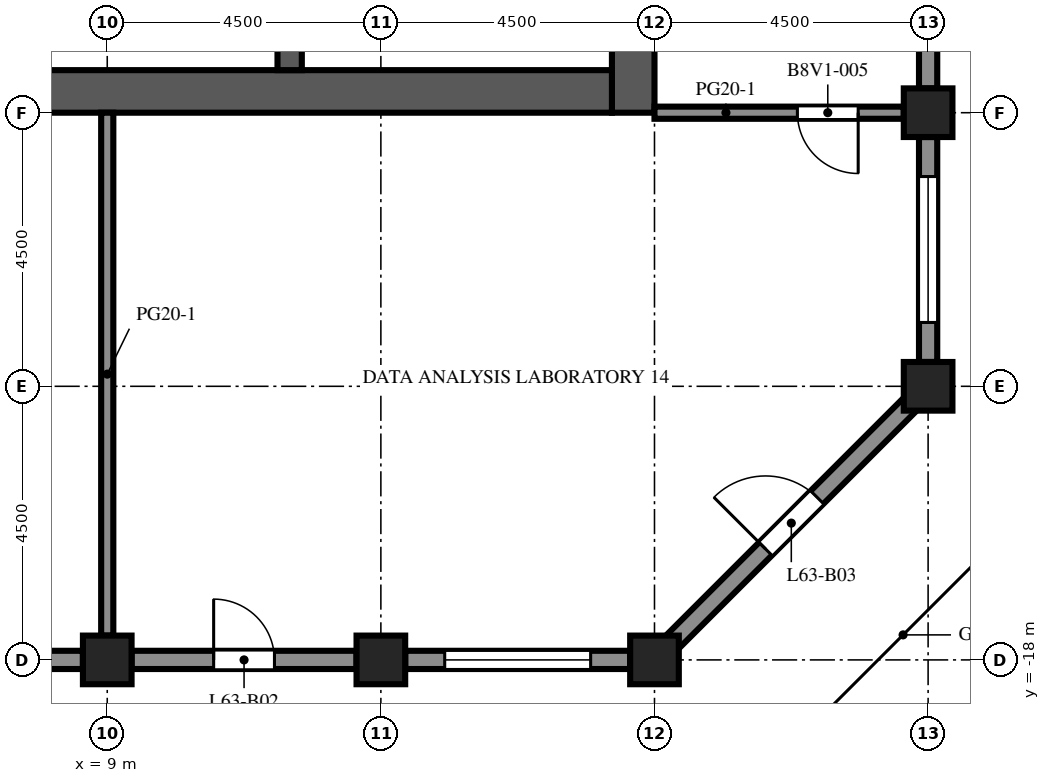
"""IFC4 building model, lengths in metres.
Left out: names, types, materials, properties, quantities, classifications, styles, units other than length and angle.
Written with IfcOpenShell. Run it as: python <this file> out.ifc"""

import sys

from ifc_helpers import new_model, si_unit, direction, frame, frame_2d, origin, origin_2d, place, context, subcontext, project, spatial, rectangle, extrude, element, fill, save


model = new_model("IFC4")
c1 = context("Model", 3, precision=1e-05, world=origin(), true_north=direction((0.0, 1.0)))
c2 = subcontext(c1, "Body", "Model", "MODEL_VIEW")
j1 = project(units=[si_unit("LENGTHUNIT", "METRE"), si_unit("PLANEANGLEUNIT", "RADIAN")], contexts=[c1])
p1 = place(None, origin())
s1 = spatial("IfcSite", under=j1, at=p1, CompositionType="ELEMENT")
p2 = place(p1, origin())
s2 = spatial("IfcBuilding", under=s1, at=p2, CompositionType="ELEMENT")
p3 = place(p2, frame((0.0, 0.0, 278.6)))
s3 = spatial("IfcBuildingStorey", under=s2, at=p3, CompositionType="ELEMENT", Elevation=278.6)
for number, where, z_axis, x_axis in (
    (1, (9.0, -18.0, 0.0), (0.0, 0.0, 1.0), (1.0, 0.0, 0.0)),
    (2, (13.5, -18.0, 0.0), (0.0, 0.0, 1.0), (1.0, 0.0, 0.0)),
    (3, (18.0, -18.0, 0.0), (0.0, 0.0, 1.0), (1.0, 0.0, 0.0)),
    (4, (22.5, -13.5, 0.0), (0.0, 0.0, 1.0), (1.0, 0.0, 0.0)),
    (5, (22.5, -9.0, 0.0), (0.0, 0.0, 1.0), (1.0, 0.0, 0.0)),
):
    element("IfcColumn", number, at=place(p3, frame(where, z_axis=z_axis, x_axis=x_axis)), inside=s3, PredefinedType="COLUMN", context=c2, shape_type="SweptSolid", body=[
        extrude(rectangle(XDim=0.8, YDim=0.8, at=origin_2d()), origin(), (0.0, 0.0, 1.0), 4.1),
    ])
p4 = place(p3, frame((17.65, -9.0, 0.0), z_axis=(0.0, 0.0, 1.0), x_axis=(0.0, 1.0, 0.0)))
e6 = element("IfcWall", 6, at=p4, inside=s3, PredefinedType="SHEAR", context=c2, shape_type="SweptSolid", body=[
    extrude(rectangle(XDim=27.5, YDim=0.7, at=frame_2d((13.75, 0.0))), origin(), (0.0, 0.0, 1.0), 4.1),
])
p5 = place(p4, frame((12.55, 0.0, 0.0)))
e7 = element("IfcOpeningElement", 7, at=p5, cuts=e6, PredefinedType="OPENING", context=c2, shape_type="SweptSolid", body=[
    extrude(rectangle(XDim=2.4, YDim=2.4, at=frame_2d((1.2, 1.2))), frame((0.0, 0.36, 0.0), z_axis=(0.0, -1.0, 0.0), x_axis=(1.0, 0.0, 0.0)), (0.0, 0.0, 1.0), 0.72),
])
p6 = place(p4, frame((6.825, 0.0, 0.0)))
e8 = element("IfcOpeningElement", 8, at=p6, cuts=e6, PredefinedType="OPENING", context=c2, shape_type="SweptSolid", body=[
    extrude(rectangle(XDim=1.2, YDim=2.1, at=frame_2d((0.6, 1.05))), frame((0.0, 0.36, 0.0), z_axis=(0.0, -1.0, 0.0), x_axis=(1.0, 0.0, 0.0)), (0.0, 0.0, 1.0), 0.72),
])
p7 = place(p4, frame((19.475, 0.0, 0.0)))
e9 = element("IfcOpeningElement", 9, at=p7, cuts=e6, PredefinedType="OPENING", context=c2, shape_type="SweptSolid", body=[
    extrude(rectangle(XDim=1.2, YDim=2.1, at=frame_2d((0.6, 1.05))), frame((0.0, 0.36, 0.0), z_axis=(0.0, -1.0, 0.0), x_axis=(1.0, 0.0, 0.0)), (0.0, 0.0, 1.0), 0.72),
])
p8 = place(p3, frame((6.7, -8.65, 0.0), z_axis=(0.0, 0.0, 1.0), x_axis=(1.0, 0.0, 0.0)))
e10 = element("IfcWall", 10, at=p8, inside=s3, PredefinedType="SHEAR", context=c2, shape_type="SweptSolid", body=[
    extrude(rectangle(XDim=10.6, YDim=0.7, at=frame_2d((5.3, 0.0))), origin(), (0.0, 0.0, 1.0), 4.1),
])
p9 = place(p3, frame((12.0, -8.3, 0.0), z_axis=(0.0, 0.0, 1.0), x_axis=(0.0, 1.0, 0.0)))
e11 = element("IfcWall", 11, at=p9, inside=s3, PredefinedType="SHEAR", context=c2, shape_type="SweptSolid", body=[
    extrude(rectangle(XDim=7.6, YDim=0.4, at=frame_2d((3.8, 0.0))), origin(), (0.0, 0.0, 1.0), 4.1),
])
p10 = place(p3, frame((8.6, -18.0, 0.0), z_axis=(0.0, 0.0, 1.0), x_axis=(-1.0, 0.0, 0.0)))
e12 = element("IfcWall", 12, at=p10, inside=s3, PredefinedType="SOLIDWALL", context=c2, shape_type="SweptSolid", body=[
    extrude(rectangle(XDim=3.7, YDim=0.3, at=frame_2d((1.85, 0.0))), origin(), (0.0, 0.0, 1.0), 2.85),
])
p11 = place(p10, frame((0.65, 0.0, 0.8)))
e13 = element("IfcOpeningElement", 13, at=p11, cuts=e12, PredefinedType="OPENING", context=c2, shape_type="SweptSolid", body=[
    extrude(rectangle(XDim=2.4, YDim=1.7, at=frame_2d((1.2, 0.85))), frame((0.0, 0.16, 0.0), z_axis=(0.0, -1.0, 0.0), x_axis=(1.0, 0.0, 0.0)), (0.0, 0.0, 1.0), 0.32),
])
p12 = place(p3, frame((13.1, -18.0, 0.0), z_axis=(0.0, 0.0, 1.0), x_axis=(-1.0, 0.0, 0.0)))
e14 = element("IfcWall", 14, at=p12, inside=s3, PredefinedType="SOLIDWALL", context=c2, shape_type="SweptSolid", body=[
    extrude(rectangle(XDim=3.7, YDim=0.3, at=frame_2d((1.85, 0.0))), origin(), (0.0, 0.0, 1.0), 2.85),
])
p13 = place(p12, frame((1.35, 0.0, 0.0)))
e15 = element("IfcOpeningElement", 15, at=p13, cuts=e14, PredefinedType="OPENING", context=c2, shape_type="SweptSolid", body=[
    extrude(rectangle(XDim=1.0, YDim=2.2, at=frame_2d((0.5, 1.1))), frame((0.0, 0.16, 0.0), z_axis=(0.0, -1.0, 0.0), x_axis=(1.0, 0.0, 0.0)), (0.0, 0.0, 1.0), 0.32),
])
p14 = place(p3, frame((17.6, -18.0, 0.0), z_axis=(0.0, 0.0, 1.0), x_axis=(-1.0, 0.0, 0.0)))
e16 = element("IfcWall", 16, at=p14, inside=s3, PredefinedType="SOLIDWALL", context=c2, shape_type="SweptSolid", body=[
    extrude(rectangle(XDim=3.7, YDim=0.3, at=frame_2d((1.85, 0.0))), origin(), (0.0, 0.0, 1.0), 2.85),
])
p15 = place(p14, frame((0.65, 0.0, 0.8)))
e17 = element("IfcOpeningElement", 17, at=p15, cuts=e16, PredefinedType="OPENING", context=c2, shape_type="SweptSolid", body=[
    extrude(rectangle(XDim=2.4, YDim=1.7, at=frame_2d((1.2, 0.85))), frame((0.0, 0.16, 0.0), z_axis=(0.0, -1.0, 0.0), x_axis=(1.0, 0.0, 0.0)), (0.0, 0.0, 1.0), 0.32),
])
p16 = place(p3, frame((22.206, -13.794, 0.0), z_axis=(0.0, 0.0, 1.0), x_axis=(-0.707106781187, -0.707106781187, 0.0)))
e18 = element("IfcWall", 18, at=p16, inside=s3, PredefinedType="SOLIDWALL", context=c2, shape_type="SweptSolid", body=[
    extrude(rectangle(XDim=5.532, YDim=0.3, at=frame_2d((2.766, 0.0))), origin(), (0.0, 0.0, 1.0), 2.85),
])
p17 = place(p16, frame((2.166, 0.0, 0.0)))
e19 = element("IfcOpeningElement", 19, at=p17, cuts=e18, PredefinedType="OPENING", context=c2, shape_type="SweptSolid", body=[
    extrude(rectangle(XDim=1.2, YDim=2.2, at=frame_2d((0.6, 1.1))), frame((0.0, 0.16, 0.0), z_axis=(0.0, -1.0, 0.0), x_axis=(1.0, 0.0, 0.0)), (0.0, 0.0, 1.0), 0.32),
])
p18 = place(p3, frame((22.5, -9.4, 0.0), z_axis=(0.0, 0.0, 1.0), x_axis=(0.0, -1.0, 0.0)))
e20 = element("IfcWall", 20, at=p18, inside=s3, PredefinedType="SOLIDWALL", context=c2, shape_type="SweptSolid", body=[
    extrude(rectangle(XDim=3.7, YDim=0.3, at=frame_2d((1.85, 0.0))), origin(), (0.0, 0.0, 1.0), 2.85),
])
p19 = place(p18, frame((0.65, 0.0, 0.8)))
e21 = element("IfcOpeningElement", 21, at=p19, cuts=e20, PredefinedType="OPENING", context=c2, shape_type="SweptSolid", body=[
    extrude(rectangle(XDim=2.4, YDim=1.7, at=frame_2d((1.2, 0.85))), frame((0.0, 0.16, 0.0), z_axis=(0.0, -1.0, 0.0), x_axis=(1.0, 0.0, 0.0)), (0.0, 0.0, 1.0), 0.32),
])
p20 = place(p3, frame((22.5, -4.9, 0.0), z_axis=(0.0, 0.0, 1.0), x_axis=(0.0, -1.0, 0.0)))
e22 = element("IfcWall", 22, at=p20, inside=s3, PredefinedType="SOLIDWALL", context=c2, shape_type="SweptSolid", body=[
    extrude(rectangle(XDim=3.7, YDim=0.3, at=frame_2d((1.85, 0.0))), origin(), (0.0, 0.0, 1.0), 2.85),
])
p21 = place(p20, frame((1.35, 0.0, 0.0)))
e23 = element("IfcOpeningElement", 23, at=p21, cuts=e22, PredefinedType="OPENING", context=c2, shape_type="SweptSolid", body=[
    extrude(rectangle(XDim=1.0, YDim=2.2, at=frame_2d((0.5, 1.1))), frame((0.0, 0.16, 0.0), z_axis=(0.0, -1.0, 0.0), x_axis=(1.0, 0.0, 0.0)), (0.0, 0.0, 1.0), 0.32),
])
p22 = place(p3, frame((9.0, -17.6, 0.0), z_axis=(0.0, 0.0, 1.0), x_axis=(0.0, 1.0, 0.0)))
e24 = element("IfcWall", 24, at=p22, inside=s3, PredefinedType="PARTITIONING", context=c2, shape_type="SweptSolid", body=[
    extrude(rectangle(XDim=8.6, YDim=0.2, at=frame_2d((4.3, 0.0))), origin(), (0.0, 0.0, 1.0), 3.65),
])
p23 = place(p3, frame((22.1, -9.0, 0.0), z_axis=(0.0, 0.0, 1.0), x_axis=(-1.0, 0.0, 0.0)))
e25 = element("IfcWall", 25, at=p23, inside=s3, PredefinedType="PARTITIONING", context=c2, shape_type="SweptSolid", body=[
    extrude(rectangle(XDim=4.1, YDim=0.2, at=frame_2d((2.05, 0.0))), origin(), (0.0, 0.0, 1.0), 3.65),
])
p24 = place(p23, frame((0.75, 0.0, 0.0)))
e26 = element("IfcOpeningElement", 26, at=p24, cuts=e25, PredefinedType="OPENING", context=c2, shape_type="SweptSolid", body=[
    extrude(rectangle(XDim=1.0, YDim=2.1, at=frame_2d((0.5, 1.05))), frame((0.0, 0.11, 0.0), z_axis=(0.0, -1.0, 0.0), x_axis=(1.0, 0.0, 0.0)), (0.0, 0.0, 1.0), 0.22),
])
p25 = place(p13, origin())
e27 = element("IfcDoor", 27, at=p25, inside=s3, OperationType="SINGLE_SWING_RIGHT", PredefinedType="DOOR", context=c2, shape_type="SweptSolid", body=[
    extrude(rectangle(XDim=1.0, YDim=2.2, at=frame_2d((0.5, 1.1))), frame((0.0, 0.025, 0.0), z_axis=(0.0, -1.0, 0.0), x_axis=(1.0, 0.0, 0.0)), (0.0, 0.0, 1.0), 0.05),
])
fill(e15, e27)
p26 = place(p15, origin())
e28 = element("IfcWindow", 28, at=p26, inside=s3, PartitioningType="SINGLE_PANEL", PredefinedType="WINDOW", context=c2, shape_type="SweptSolid", body=[
    extrude(rectangle(XDim=2.4, YDim=1.7, at=frame_2d((1.2, 0.85))), frame((0.0, 0.03, 0.0), z_axis=(0.0, -1.0, 0.0), x_axis=(1.0, 0.0, 0.0)), (0.0, 0.0, 1.0), 0.06),
])
fill(e17, e28)
p27 = place(p17, origin())
e29 = element("IfcDoor", 29, at=p27, inside=s3, OperationType="SINGLE_SWING_RIGHT", PredefinedType="DOOR", context=c2, shape_type="SweptSolid", body=[
    extrude(rectangle(XDim=1.2, YDim=2.2, at=frame_2d((0.6, 1.1))), frame((0.0, 0.025, 0.0), z_axis=(0.0, -1.0, 0.0), x_axis=(1.0, 0.0, 0.0)), (0.0, 0.0, 1.0), 0.05),
])
fill(e19, e29)
p28 = place(p19, origin())
e30 = element("IfcWindow", 30, at=p28, inside=s3, PartitioningType="SINGLE_PANEL", PredefinedType="WINDOW", context=c2, shape_type="SweptSolid", body=[
    extrude(rectangle(XDim=2.4, YDim=1.7, at=frame_2d((1.2, 0.85))), frame((0.0, 0.03, 0.0), z_axis=(0.0, -1.0, 0.0), x_axis=(1.0, 0.0, 0.0)), (0.0, 0.0, 1.0), 0.06),
])
fill(e21, e30)
p29 = place(p24, origin())
e31 = element("IfcDoor", 31, at=p29, inside=s3, OperationType="SINGLE_SWING_LEFT", PredefinedType="DOOR", context=c2, shape_type="SweptSolid", body=[
    extrude(rectangle(XDim=1.0, YDim=2.1, at=frame_2d((0.5, 1.05))), frame((0.0, 0.025, 0.0), z_axis=(0.0, -1.0, 0.0), x_axis=(1.0, 0.0, 0.0)), (0.0, 0.0, 1.0), 0.05),
])
fill(e26, e31)
save(model, sys.argv[1])
